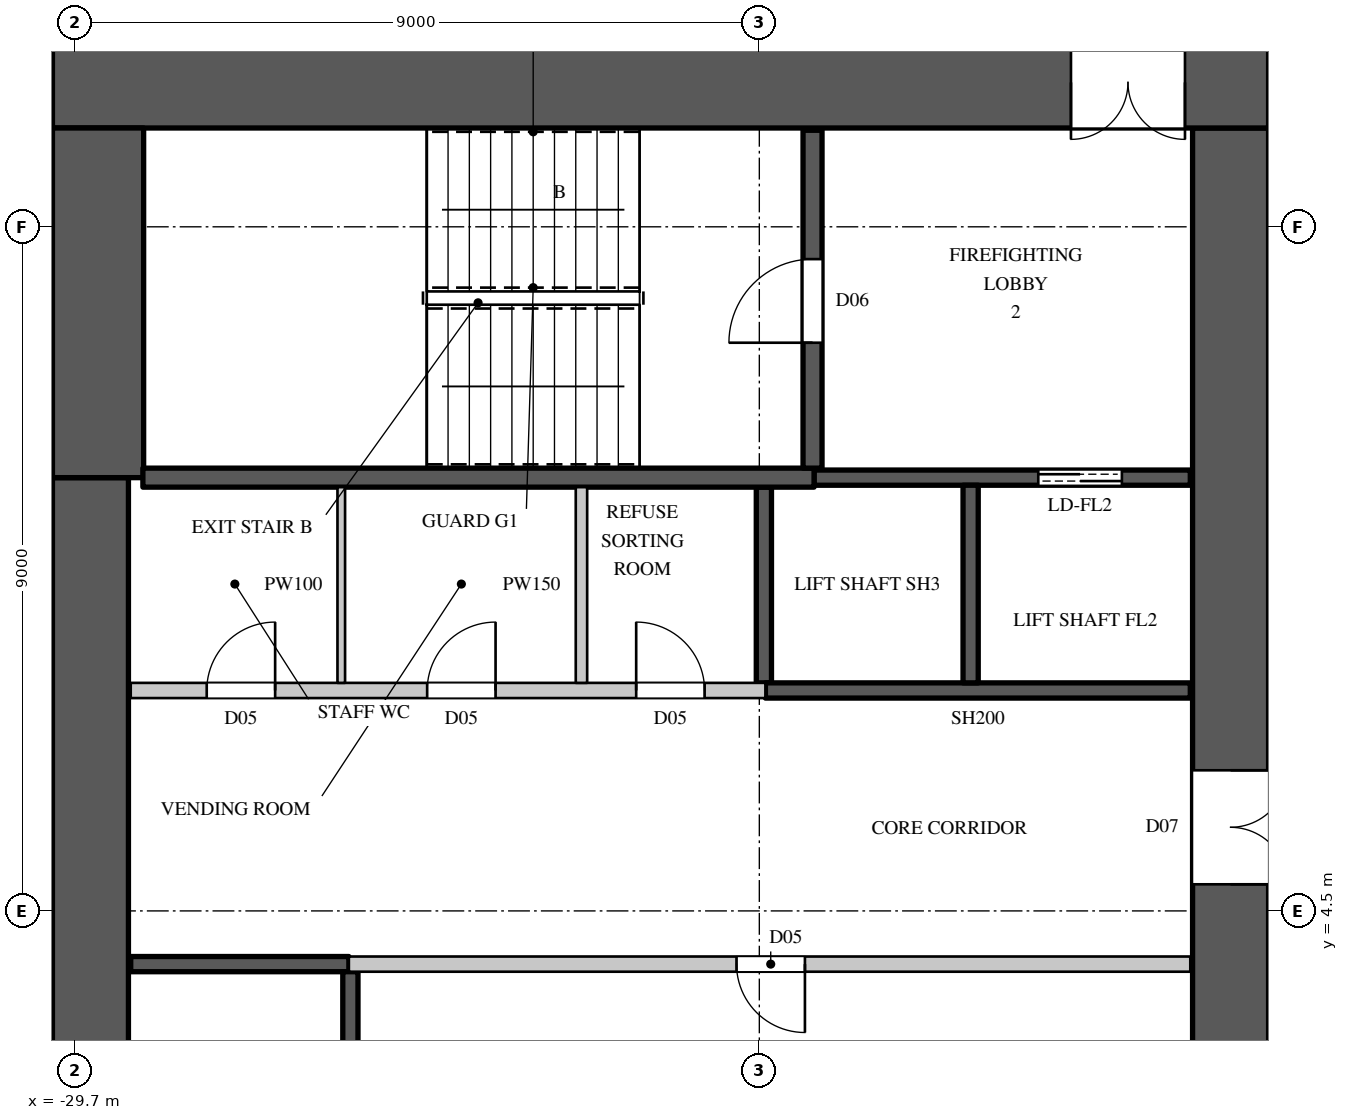
"""IFC4 building model, lengths in metres.
Left out: names, types, materials, properties, quantities, classifications, styles, units other than length and angle.
Written with IfcOpenShell. Run it as: python <this file> out.ifc"""

import sys

from ifc_helpers import new_model, si_unit, direction, frame, frame_2d, origin, place, context, subcontext, project, spatial, rectangle, extrude, element, fill, save


model = new_model("IFC4")
c1 = context("Model", 3, precision=1e-05, world=origin(), true_north=direction((0.0, 1.0)))
c2 = subcontext(c1, "Body", "Model", "MODEL_VIEW")
j1 = project(units=[si_unit("LENGTHUNIT", "METRE"), si_unit("PLANEANGLEUNIT", "RADIAN")], contexts=[c1])
p1 = place(None, origin())
s1 = spatial("IfcSite", under=j1, at=p1, CompositionType="ELEMENT")
p2 = place(p1, origin())
s2 = spatial("IfcBuilding", under=s1, at=p2, CompositionType="ELEMENT")
p3 = place(p2, frame((0.0, 0.0, 69.9)))
s3 = spatial("IfcBuildingStorey", under=s2, at=p3, CompositionType="ELEMENT", Elevation=69.9)
p4 = place(p3, frame((-30.0, 15.4, 0.0), z_axis=(0.0, 0.0, 1.0), x_axis=(1.0, 0.0, 0.0)))
e1 = element("IfcWall", 1, at=p4, inside=s3, PredefinedType="SHEAR", context=c2, shape_type="SweptSolid", body=[
    extrude(rectangle(XDim=16.0, YDim=1.2, at=frame_2d((8.0, 0.0))), origin(), (0.0, 0.0, 1.0), 3.6),
])
p5 = place(p4, frame((13.4, 0.0, 0.0)))
e2 = element("IfcOpeningElement", 2, at=p5, cuts=e1, PredefinedType="OPENING", context=c2, shape_type="SweptSolid", body=[
    extrude(rectangle(XDim=1.5, YDim=2.4, at=frame_2d((0.75, 1.2))), frame((0.0, 0.61, 0.0), z_axis=(0.0, -1.0, 0.0), x_axis=(1.0, 0.0, 0.0)), (0.0, 0.0, 1.0), 1.22),
])
p6 = place(p3, frame((-14.5, -14.8, 0.0), z_axis=(0.0, 0.0, 1.0), x_axis=(0.0, 1.0, 0.0)))
e3 = element("IfcWall", 3, at=p6, inside=s3, PredefinedType="SHEAR", context=c2, shape_type="SweptSolid", body=[
    extrude(rectangle(XDim=29.6, YDim=1.0, at=frame_2d((14.8, 0.0))), origin(), (0.0, 0.0, 1.0), 3.6),
])
p7 = place(p6, frame((8.45, 0.0, 0.0)))
e4 = element("IfcOpeningElement", 4, at=p7, cuts=e3, PredefinedType="OPENING", context=c2, shape_type="SweptSolid", body=[
    extrude(rectangle(XDim=1.5, YDim=2.4, at=frame_2d((0.75, 1.2))), frame((0.0, 0.51, 0.0), z_axis=(0.0, -1.0, 0.0), x_axis=(1.0, 0.0, 0.0)), (0.0, 0.0, 1.0), 1.02),
])
p8 = place(p6, frame((19.65, 0.0, 0.0)))
e5 = element("IfcOpeningElement", 5, at=p8, cuts=e3, PredefinedType="OPENING", context=c2, shape_type="SweptSolid", body=[
    extrude(rectangle(XDim=1.5, YDim=2.4, at=frame_2d((0.75, 1.2))), frame((0.0, 0.51, 0.0), z_axis=(0.0, -1.0, 0.0), x_axis=(1.0, 0.0, 0.0)), (0.0, 0.0, 1.0), 1.02),
])
p9 = place(p6, frame((14.5, 0.0, 0.0)))
e6 = element("IfcOpeningElement", 6, at=p9, cuts=e3, PredefinedType="OPENING", context=c2, shape_type="SweptSolid", body=[
    extrude(rectangle(XDim=0.6, YDim=2.0, at=frame_2d((0.3, 1.0))), frame((0.0, 0.51, 0.0), z_axis=(0.0, -1.0, 0.0), x_axis=(1.0, 0.0, 0.0)), (0.0, 0.0, 1.0), 1.02),
])
p10 = place(p3, frame((-29.5, -10.2, 0.0), z_axis=(0.0, 0.0, 1.0), x_axis=(0.0, 1.0, 0.0)))
e7 = element("IfcWall", 7, at=p10, inside=s3, PredefinedType="SHEAR", context=c2, shape_type="SweptSolid", body=[
    extrude(rectangle(XDim=20.4, YDim=1.0, at=frame_2d((10.2, 0.0))), origin(), (0.0, 0.0, 1.0), 3.6),
])
p11 = place(p3, frame((-29.4, 10.2, 0.0), z_axis=(0.0, 0.0, 1.0), x_axis=(0.0, 1.0, 0.0)))
e8 = element("IfcWall", 8, at=p11, inside=s3, PredefinedType="SHEAR", context=c2, shape_type="SweptSolid", body=[
    extrude(rectangle(XDim=4.6, YDim=1.2, at=frame_2d((2.3, 0.0))), origin(), (0.0, 0.0, 1.0), 3.6),
])
p12 = place(p3, frame((-28.97, 7.4, 0.0), z_axis=(0.0, 0.0, 1.0), x_axis=(1.0, 0.0, 0.0)))
e9 = element("IfcWall", 9, at=p12, inside=s3, PredefinedType="PARTITIONING", context=c2, shape_type="SweptSolid", body=[
    extrude(rectangle(XDim=8.35, YDim=0.2, at=frame_2d((4.175, 0.0))), origin(), (0.0, 0.0, 1.0), 3.3),
])
p13 = place(p12, frame((1.0, 0.0, 0.0)))
e10 = element("IfcOpeningElement", 10, at=p13, cuts=e9, PredefinedType="OPENING", context=c2, shape_type="SweptSolid", body=[
    extrude(rectangle(XDim=0.9, YDim=2.2, at=frame_2d((0.45, 1.1))), frame((0.0, 0.11, 0.0), z_axis=(0.0, -1.0, 0.0), x_axis=(1.0, 0.0, 0.0)), (0.0, 0.0, 1.0), 0.22),
])
p14 = place(p12, frame((3.9, 0.0, 0.0)))
e11 = element("IfcOpeningElement", 11, at=p14, cuts=e9, PredefinedType="OPENING", context=c2, shape_type="SweptSolid", body=[
    extrude(rectangle(XDim=0.9, YDim=2.2, at=frame_2d((0.45, 1.1))), frame((0.0, 0.11, 0.0), z_axis=(0.0, -1.0, 0.0), x_axis=(1.0, 0.0, 0.0)), (0.0, 0.0, 1.0), 0.22),
])
p15 = place(p12, frame((6.65, 0.0, 0.0)))
e12 = element("IfcOpeningElement", 12, at=p15, cuts=e9, PredefinedType="OPENING", context=c2, shape_type="SweptSolid", body=[
    extrude(rectangle(XDim=0.9, YDim=2.2, at=frame_2d((0.45, 1.1))), frame((0.0, 0.11, 0.0), z_axis=(0.0, -1.0, 0.0), x_axis=(1.0, 0.0, 0.0)), (0.0, 0.0, 1.0), 0.22),
])
p16 = place(p3, frame((-23.04, 7.5, 0.0), z_axis=(0.0, 0.0, 1.0), x_axis=(0.0, 1.0, 0.0)))
e13 = element("IfcWall", 13, at=p16, inside=s3, PredefinedType="PARTITIONING", context=c2, shape_type="SweptSolid", body=[
    extrude(rectangle(XDim=2.575, YDim=0.15, at=frame_2d((1.288, 0.0))), origin(), (0.0, 0.0, 1.0), 3.3),
])
p17 = place(p3, frame((-26.1, 3.8, 0.0), z_axis=(0.0, 0.0, 1.0), x_axis=(1.0, 0.0, 0.0)))
e14 = element("IfcWall", 14, at=p17, inside=s3, PredefinedType="PARTITIONING", context=c2, shape_type="SweptSolid", body=[
    extrude(rectangle(XDim=11.07, YDim=0.2, at=frame_2d((5.535, 0.0))), origin(), (0.0, 0.0, 1.0), 3.3),
])
p18 = place(p17, frame((5.1, 0.0, 0.0)))
e15 = element("IfcOpeningElement", 15, at=p18, cuts=e14, PredefinedType="OPENING", context=c2, shape_type="SweptSolid", body=[
    extrude(rectangle(XDim=0.9, YDim=2.2, at=frame_2d((0.45, 1.1))), frame((0.0, 0.11, 0.0), z_axis=(0.0, -1.0, 0.0), x_axis=(1.0, 0.0, 0.0)), (0.0, 0.0, 1.0), 0.22),
])
p19 = place(p3, frame((-28.97, 3.8, 0.0), z_axis=(0.0, 0.0, 1.0), x_axis=(1.0, 0.0, 0.0)))
e16 = element("IfcWall", 16, at=p19, inside=s3, PredefinedType="SHEAR", context=c2, shape_type="SweptSolid", body=[
    extrude(rectangle(XDim=2.87, YDim=0.2, at=frame_2d((1.435, 0.0))), origin(), (0.0, 0.0, 1.0), 3.3),
])
p20 = place(p3, frame((-26.08, 1.1, 0.0), z_axis=(0.0, 0.0, 1.0), x_axis=(0.0, 1.0, 0.0)))
e17 = element("IfcWall", 17, at=p20, inside=s3, PredefinedType="SHEAR", context=c2, shape_type="SweptSolid", body=[
    extrude(rectangle(XDim=2.6, YDim=0.2, at=frame_2d((1.3, 0.0))), origin(), (0.0, 0.0, 1.0), 3.3),
])
p21 = place(p3, frame((-20.64, 7.5, 0.0), z_axis=(0.0, 0.0, 1.0), x_axis=(0.0, 1.0, 0.0)))
e18 = element("IfcWall", 18, at=p21, inside=s3, PredefinedType="SHEAR", context=c2, shape_type="SweptSolid", body=[
    extrude(rectangle(XDim=2.575, YDim=0.2, at=frame_2d((1.288, 0.0))), origin(), (0.0, 0.0, 1.0), 3.3),
])
p22 = place(p3, frame((-20.62, 7.4, 0.0), z_axis=(0.0, 0.0, 1.0), x_axis=(1.0, 0.0, 0.0)))
e19 = element("IfcWall", 19, at=p22, inside=s3, PredefinedType="SHEAR", context=c2, shape_type="SweptSolid", body=[
    extrude(rectangle(XDim=5.59, YDim=0.2, at=frame_2d((2.795, 0.0))), origin(), (0.0, 0.0, 1.0), 3.3),
])
p23 = place(p3, frame((-19.98, 10.2, 0.0), z_axis=(0.0, 0.0, 1.0), x_axis=(1.0, 0.0, 0.0)))
e20 = element("IfcWall", 20, at=p23, inside=s3, PredefinedType="SHEAR", context=c2, shape_type="SweptSolid", body=[
    extrude(rectangle(XDim=4.95, YDim=0.2, at=frame_2d((2.475, 0.0))), origin(), (0.0, 0.0, 1.0), 3.3),
])
p24 = place(p23, frame((2.95, 0.0, 0.0)))
e21 = element("IfcOpeningElement", 21, at=p24, cuts=e20, PredefinedType="OPENING", context=c2, shape_type="SweptSolid", body=[
    extrude(rectangle(XDim=1.1, YDim=2.2, at=frame_2d((0.55, 1.1))), frame((0.0, 0.11, 0.0), z_axis=(0.0, -1.0, 0.0), x_axis=(1.0, 0.0, 0.0)), (0.0, 0.0, 1.0), 0.22),
])
p25 = place(p3, frame((-17.92, 7.5, 0.0), z_axis=(0.0, 0.0, 1.0), x_axis=(0.0, 1.0, 0.0)))
e22 = element("IfcWall", 22, at=p25, inside=s3, PredefinedType="SHEAR", context=c2, shape_type="SweptSolid", body=[
    extrude(rectangle(XDim=2.6, YDim=0.2, at=frame_2d((1.3, 0.0))), origin(), (0.0, 0.0, 1.0), 3.6),
])
p26 = place(p3, frame((-28.81, 10.2, 0.0), z_axis=(0.0, 0.0, 1.0), x_axis=(1.0, 0.0, 0.0)))
e23 = element("IfcWall", 23, at=p26, inside=s3, PredefinedType="SHEAR", context=c2, shape_type="SweptSolid", body=[
    extrude(rectangle(XDim=8.83, YDim=0.25, at=frame_2d((4.415, 0.0))), origin(), (0.0, 0.0, 1.0), 3.3),
])
p27 = place(p3, frame((-20.0, 10.325, 0.0), z_axis=(0.0, 0.0, 1.0), x_axis=(0.0, 1.0, 0.0)))
e24 = element("IfcWall", 24, at=p27, inside=s3, PredefinedType="SHEAR", context=c2, shape_type="SweptSolid", body=[
    extrude(rectangle(XDim=4.445, YDim=0.25, at=frame_2d((2.223, 0.0))), origin(), (0.0, 0.0, 1.0), 3.3),
])
p28 = place(p27, frame((1.65, 0.0, 0.0)))
e25 = element("IfcOpeningElement", 25, at=p28, cuts=e24, PredefinedType="OPENING", context=c2, shape_type="SweptSolid", body=[
    extrude(rectangle(XDim=1.1, YDim=2.2, at=frame_2d((0.55, 1.1))), frame((0.0, 0.135, 0.0), z_axis=(0.0, -1.0, 0.0), x_axis=(1.0, 0.0, 0.0)), (0.0, 0.0, 1.0), 0.27),
])
p29 = place(p3, frame((-26.2, 7.5, 0.0), z_axis=(0.0, 0.0, 1.0), x_axis=(0.0, 1.0, 0.0)))
e26 = element("IfcWall", 26, at=p29, inside=s3, PredefinedType="PARTITIONING", context=c2, shape_type="SweptSolid", body=[
    extrude(rectangle(XDim=2.575, YDim=0.1, at=frame_2d((1.288, 0.0))), origin(), (0.0, 0.0, 1.0), 3.3),
])
p30 = place(p28, origin())
e27 = element("IfcDoor", 27, at=p30, inside=s3, OperationType="SINGLE_SWING_LEFT", PredefinedType="DOOR", context=c2, shape_type="SweptSolid", body=[
    extrude(rectangle(XDim=1.1, YDim=2.2, at=frame_2d((0.55, 1.1))), frame((0.0, 0.025, 0.0), z_axis=(0.0, -1.0, 0.0), x_axis=(1.0, 0.0, 0.0)), (0.0, 0.0, 1.0), 0.05),
])
fill(e25, e27)
p31 = place(p18, origin())
e28 = element("IfcDoor", 28, at=p31, inside=s3, OperationType="SINGLE_SWING_LEFT", PredefinedType="DOOR", context=c2, shape_type="SweptSolid", body=[
    extrude(rectangle(XDim=0.9, YDim=2.2, at=frame_2d((0.45, 1.1))), frame((0.0, 0.025, 0.0), z_axis=(0.0, -1.0, 0.0), x_axis=(1.0, 0.0, 0.0)), (0.0, 0.0, 1.0), 0.05),
])
fill(e15, e28)
p32 = place(p13, origin())
e29 = element("IfcDoor", 29, at=p32, inside=s3, OperationType="SINGLE_SWING_RIGHT", PredefinedType="DOOR", context=c2, shape_type="SweptSolid", body=[
    extrude(rectangle(XDim=0.9, YDim=2.2, at=frame_2d((0.45, 1.1))), frame((0.0, 0.025, 0.0), z_axis=(0.0, -1.0, 0.0), x_axis=(1.0, 0.0, 0.0)), (0.0, 0.0, 1.0), 0.05),
])
fill(e10, e29)
p33 = place(p14, origin())
e30 = element("IfcDoor", 30, at=p33, inside=s3, OperationType="SINGLE_SWING_RIGHT", PredefinedType="DOOR", context=c2, shape_type="SweptSolid", body=[
    extrude(rectangle(XDim=0.9, YDim=2.2, at=frame_2d((0.45, 1.1))), frame((0.0, 0.025, 0.0), z_axis=(0.0, -1.0, 0.0), x_axis=(1.0, 0.0, 0.0)), (0.0, 0.0, 1.0), 0.05),
])
fill(e11, e30)
p34 = place(p15, origin())
e31 = element("IfcDoor", 31, at=p34, inside=s3, OperationType="SINGLE_SWING_LEFT", PredefinedType="DOOR", context=c2, shape_type="SweptSolid", body=[
    extrude(rectangle(XDim=0.9, YDim=2.2, at=frame_2d((0.45, 1.1))), frame((0.0, 0.025, 0.0), z_axis=(0.0, -1.0, 0.0), x_axis=(1.0, 0.0, 0.0)), (0.0, 0.0, 1.0), 0.05),
])
fill(e12, e31)
p35 = place(p24, origin())
e32 = element("IfcDoor", 32, at=p35, inside=s3, OperationType="DOUBLE_DOOR_SLIDING", PredefinedType="DOOR", context=c2, shape_type="SweptSolid", body=[
    extrude(rectangle(XDim=1.1, YDim=2.2, at=frame_2d((0.55, 1.1))), frame((0.0, 0.025, 0.0), z_axis=(0.0, -1.0, 0.0), x_axis=(1.0, 0.0, 0.0)), (0.0, 0.0, 1.0), 0.05),
])
fill(e21, e32)
p36 = place(p5, origin())
e33 = element("IfcDoor", 33, at=p36, inside=s3, OperationType="DOUBLE_DOOR_SINGLE_SWING", PredefinedType="DOOR", context=c2, shape_type="SweptSolid", body=[
    extrude(rectangle(XDim=1.5, YDim=2.4, at=frame_2d((0.75, 1.2))), frame((0.0, 0.025, 0.0), z_axis=(0.0, -1.0, 0.0), x_axis=(1.0, 0.0, 0.0)), (0.0, 0.0, 1.0), 0.05),
])
fill(e2, e33)
p37 = place(p8, origin())
e34 = element("IfcDoor", 34, at=p37, inside=s3, OperationType="DOUBLE_DOOR_SINGLE_SWING", PredefinedType="DOOR", context=c2, shape_type="SweptSolid", body=[
    extrude(rectangle(XDim=1.5, YDim=2.4, at=frame_2d((0.75, 1.2))), frame((0.0, -0.445, 0.0), z_axis=(0.0, -1.0, 0.0), x_axis=(1.0, 0.0, 0.0)), (0.0, 0.0, 1.0), 0.05),
])
fill(e5, e34)
save(model, sys.argv[1])
